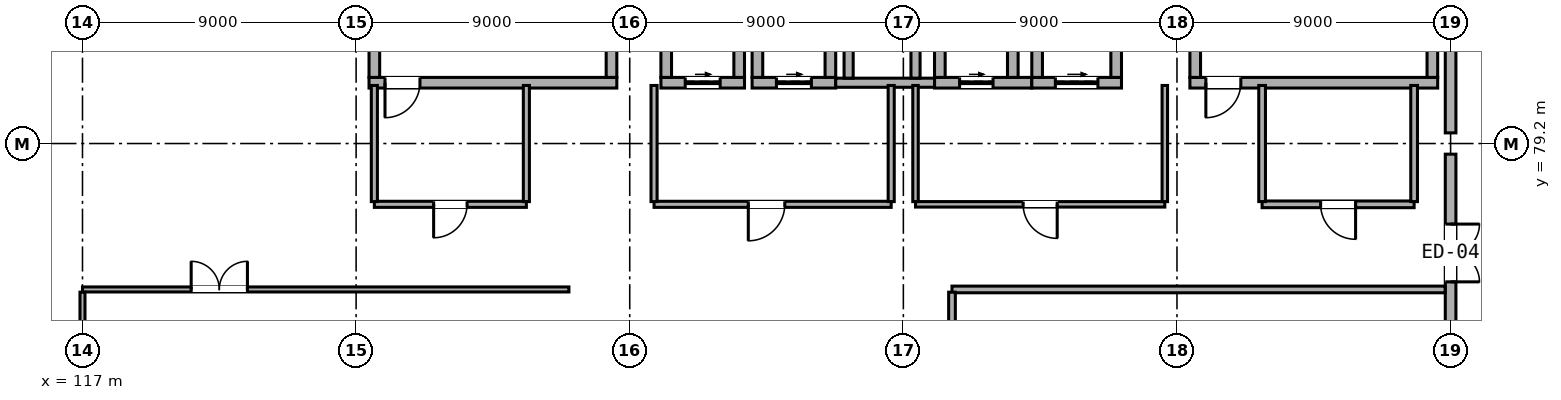
"""IFC4 building model, lengths in metres.
Left out: names, types, materials, properties, quantities, classifications, styles, units other than length and angle.
Written with IfcOpenShell. Run it as: python <this file> out.ifc"""

import sys

from ifc_helpers import new_model, si_unit, direction, frame, frame_2d, origin, origin_2d, place, context, subcontext, project, spatial, rectangle, hollow_rectangle, extrude, element, fill, save


model = new_model("IFC4")
c1 = context("Model", 3, precision=1e-05, world=origin(), true_north=direction((0.0, 1.0)))
c2 = subcontext(c1, "Body", "Model", "MODEL_VIEW")
j1 = project(units=[si_unit("LENGTHUNIT", "METRE"), si_unit("PLANEANGLEUNIT", "RADIAN")], contexts=[c1])
p1 = place(None, origin())
s1 = spatial("IfcSite", under=j1, at=p1, CompositionType="ELEMENT")
p2 = place(p1, origin())
s2 = spatial("IfcBuilding", under=s1, at=p2, CompositionType="ELEMENT")
p3 = place(p2, origin())
s3 = spatial("IfcBuildingStorey", under=s2, at=p3, CompositionType="ELEMENT", Elevation=0.0)
p4 = place(p3, frame((117.0, 79.2, 0.0), z_axis=(0.0, 0.0, 1.0), x_axis=(1.0, 0.0, 0.0)))
e1 = element("IfcColumn", 1, at=p4, inside=s3, PredefinedType="COLUMN", context=c2, shape_type="SweptSolid", body=[
    extrude(hollow_rectangle(XDim=0.7, YDim=0.7, WallThickness=0.028, at=origin_2d()), origin(), (0.0, 0.0, 1.0), 4.8),
])
for number, where, z_axis, x_axis in (
    (2, (126.0, 79.2, 0.0), (0.0, 0.0, 1.0), (1.0, 0.0, 0.0)),
    (3, (135.0, 79.2, 0.0), (0.0, 0.0, 1.0), (1.0, 0.0, 0.0)),
    (4, (144.0, 79.2, 0.0), (0.0, 0.0, 1.0), (1.0, 0.0, 0.0)),
    (5, (153.0, 79.2, 0.0), (0.0, 0.0, 1.0), (1.0, 0.0, 0.0)),
):
    element("IfcColumn", number, at=place(p3, frame(where, z_axis=z_axis, x_axis=x_axis)), inside=s3, PredefinedType="COLUMN", context=c2, shape_type="SweptSolid", body=[
        extrude(hollow_rectangle(XDim=0.75, YDim=0.75, WallThickness=0.032, at=origin_2d()), origin(), (0.0, 0.0, 1.0), 4.8),
    ])
p5 = place(p3, frame((162.0, 79.2, 0.0), z_axis=(0.0, 0.0, 1.0), x_axis=(1.0, 0.0, 0.0)))
e6 = element("IfcColumn", 6, at=p5, inside=s3, PredefinedType="COLUMN", context=c2, shape_type="SweptSolid", body=[
    extrude(hollow_rectangle(XDim=0.7, YDim=0.7, WallThickness=0.028, at=origin_2d()), origin(), (0.0, 0.0, 1.0), 4.8),
])
p6 = place(p3, frame((162.0, 78.85, 0.0), z_axis=(0.0, 0.0, 1.0), x_axis=(0.0, -1.0, 0.0)))
e7 = element("IfcWall", 7, at=p6, inside=s3, PredefinedType="STANDARD", context=c2, shape_type="SweptSolid", body=[
    extrude(rectangle(XDim=6.5, YDim=0.35, at=frame_2d((3.25, 0.0))), origin(), (0.0, 0.0, 1.0), 4.055),
])
p7 = place(p6, frame((2.3, 0.0, 0.0)))
e8 = element("IfcOpeningElement", 8, at=p7, cuts=e7, PredefinedType="OPENING", context=c2, shape_type="SweptSolid", body=[
    extrude(rectangle(XDim=1.9, YDim=2.4, at=frame_2d((0.95, 1.2))), frame((0.0, 0.187, 0.0), z_axis=(0.0, -1.0, 0.0), x_axis=(1.0, 0.0, 0.0)), (0.0, 0.0, 1.0), 0.374),
])
p8 = place(p3, frame((162.0, 86.05, 0.0), z_axis=(0.0, 0.0, 1.0), x_axis=(0.0, -1.0, 0.0)))
e9 = element("IfcWall", 9, at=p8, inside=s3, PredefinedType="STANDARD", context=c2, shape_type="SweptSolid", body=[
    extrude(rectangle(XDim=6.5, YDim=0.35, at=frame_2d((3.25, 0.0))), origin(), (0.0, 0.0, 1.0), 4.055),
])
p9 = place(p3, frame((126.425, 81.2, 0.0), z_axis=(0.0, 0.0, 1.0), x_axis=(1.0, 0.0, 0.0)))
e10 = element("IfcWall", 10, at=p9, inside=s3, PredefinedType="SHEAR", context=c2, shape_type="SweptSolid", body=[
    extrude(rectangle(XDim=8.15, YDim=0.35, at=frame_2d((4.075, 0.0))), origin(), (0.0, 0.0, 1.0), 4.555),
])
p10 = place(p9, frame((0.525, 0.0, 0.0)))
e11 = element("IfcOpeningElement", 11, at=p10, cuts=e10, PredefinedType="OPENING", context=c2, shape_type="SweptSolid", body=[
    extrude(rectangle(XDim=1.15, YDim=2.1, at=frame_2d((0.575, 1.05))), frame((0.0, 0.187, 0.0), z_axis=(0.0, -1.0, 0.0), x_axis=(1.0, 0.0, 0.0)), (0.0, 0.0, 1.0), 0.374),
])
for number, where, z_axis, x_axis in (
    (12, (126.6, 81.375, 0.0), (0.0, 0.0, 1.0), (0.0, 1.0, 0.0)),
    (13, (134.4, 81.375, 0.0), (0.0, 0.0, 1.0), (0.0, 1.0, 0.0)),
):
    element("IfcWall", number, at=place(p3, frame(where, z_axis=z_axis, x_axis=x_axis)), inside=s3, PredefinedType="SHEAR", context=c2, shape_type="SweptSolid", body=[
        extrude(rectangle(XDim=3.55, YDim=0.35, at=frame_2d((1.775, 0.0))), origin(), (0.0, 0.0, 1.0), 4.555),
    ])
p11 = place(p3, frame((153.425, 81.2, 0.0), z_axis=(0.0, 0.0, 1.0), x_axis=(1.0, 0.0, 0.0)))
e14 = element("IfcWall", 14, at=p11, inside=s3, PredefinedType="SHEAR", context=c2, shape_type="SweptSolid", body=[
    extrude(rectangle(XDim=8.15, YDim=0.35, at=frame_2d((4.075, 0.0))), origin(), (0.0, 0.0, 1.0), 4.555),
])
p12 = place(p11, frame((0.525, 0.0, 0.0)))
e15 = element("IfcOpeningElement", 15, at=p12, cuts=e14, PredefinedType="OPENING", context=c2, shape_type="SweptSolid", body=[
    extrude(rectangle(XDim=1.15, YDim=2.1, at=frame_2d((0.575, 1.05))), frame((0.0, 0.187, 0.0), z_axis=(0.0, -1.0, 0.0), x_axis=(1.0, 0.0, 0.0)), (0.0, 0.0, 1.0), 0.374),
])
for number, where, z_axis, x_axis in (
    (16, (153.6, 81.375, 0.0), (0.0, 0.0, 1.0), (0.0, 1.0, 0.0)),
    (17, (161.4, 81.375, 0.0), (0.0, 0.0, 1.0), (0.0, 1.0, 0.0)),
):
    element("IfcWall", number, at=place(p3, frame(where, z_axis=z_axis, x_axis=x_axis)), inside=s3, PredefinedType="SHEAR", context=c2, shape_type="SweptSolid", body=[
        extrude(rectangle(XDim=3.55, YDim=0.35, at=frame_2d((1.775, 0.0))), origin(), (0.0, 0.0, 1.0), 4.555),
    ])
p13 = place(p3, frame((136.025, 81.2, 0.0), z_axis=(0.0, 0.0, 1.0), x_axis=(1.0, 0.0, 0.0)))
e18 = element("IfcWall", 18, at=p13, inside=s3, PredefinedType="SHEAR", context=c2, shape_type="SweptSolid", body=[
    extrude(rectangle(XDim=2.75, YDim=0.35, at=frame_2d((1.375, 0.0))), origin(), (0.0, 0.0, 1.0), 4.555),
])
p14 = place(p13, frame((0.8, 0.0, 0.0)))
e19 = element("IfcOpeningElement", 19, at=p14, cuts=e18, PredefinedType="OPENING", context=c2, shape_type="SweptSolid", body=[
    extrude(rectangle(XDim=1.15, YDim=2.12, at=frame_2d((0.575, 1.06))), frame((0.0, 0.187, 0.0), z_axis=(0.0, -1.0, 0.0), x_axis=(1.0, 0.0, 0.0)), (0.0, 0.0, 1.0), 0.374),
])
for number, where, z_axis, x_axis in (
    (20, (136.2, 81.375, 0.0), (0.0, 0.0, 1.0), (0.0, 1.0, 0.0)),
    (21, (138.6, 81.375, 0.0), (0.0, 0.0, 1.0), (0.0, 1.0, 0.0)),
):
    element("IfcWall", number, at=place(p3, frame(where, z_axis=z_axis, x_axis=x_axis)), inside=s3, PredefinedType="SHEAR", context=c2, shape_type="SweptSolid", body=[
        extrude(rectangle(XDim=2.85, YDim=0.35, at=frame_2d((1.425, 0.0))), origin(), (0.0, 0.0, 1.0), 4.555),
    ])
p15 = place(p3, frame((139.025, 81.2, 0.0), z_axis=(0.0, 0.0, 1.0), x_axis=(1.0, 0.0, 0.0)))
e22 = element("IfcWall", 22, at=p15, inside=s3, PredefinedType="SHEAR", context=c2, shape_type="SweptSolid", body=[
    extrude(rectangle(XDim=2.75, YDim=0.35, at=frame_2d((1.375, 0.0))), origin(), (0.0, 0.0, 1.0), 4.555),
])
p16 = place(p15, frame((0.8, 0.0, 0.0)))
e23 = element("IfcOpeningElement", 23, at=p16, cuts=e22, PredefinedType="OPENING", context=c2, shape_type="SweptSolid", body=[
    extrude(rectangle(XDim=1.15, YDim=2.12, at=frame_2d((0.575, 1.06))), frame((0.0, 0.187, 0.0), z_axis=(0.0, -1.0, 0.0), x_axis=(1.0, 0.0, 0.0)), (0.0, 0.0, 1.0), 0.374),
])
for number, where, z_axis, x_axis in (
    (24, (139.2, 81.375, 0.0), (0.0, 0.0, 1.0), (0.0, 1.0, 0.0)),
    (25, (141.6, 81.375, 0.0), (0.0, 0.0, 1.0), (0.0, 1.0, 0.0)),
):
    element("IfcWall", number, at=place(p3, frame(where, z_axis=z_axis, x_axis=x_axis)), inside=s3, PredefinedType="SHEAR", context=c2, shape_type="SweptSolid", body=[
        extrude(rectangle(XDim=2.85, YDim=0.35, at=frame_2d((1.425, 0.0))), origin(), (0.0, 0.0, 1.0), 4.555),
    ])
p17 = place(p3, frame((145.025, 81.2, 0.0), z_axis=(0.0, 0.0, 1.0), x_axis=(1.0, 0.0, 0.0)))
e26 = element("IfcWall", 26, at=p17, inside=s3, PredefinedType="SHEAR", context=c2, shape_type="SweptSolid", body=[
    extrude(rectangle(XDim=3.2, YDim=0.35, at=frame_2d((1.6, 0.0))), origin(), (0.0, 0.0, 1.0), 4.555),
])
p18 = place(p17, frame((0.825, 0.0, 0.0)))
e27 = element("IfcOpeningElement", 27, at=p18, cuts=e26, PredefinedType="OPENING", context=c2, shape_type="SweptSolid", body=[
    extrude(rectangle(XDim=1.1, YDim=2.1, at=frame_2d((0.55, 1.05))), frame((0.0, 0.187, 0.0), z_axis=(0.0, -1.0, 0.0), x_axis=(1.0, 0.0, 0.0)), (0.0, 0.0, 1.0), 0.374),
])
for number, where, z_axis, x_axis in (
    (28, (145.2, 81.375, 0.0), (0.0, 0.0, 1.0), (0.0, 1.0, 0.0)),
    (29, (147.6, 81.375, 0.0), (0.0, 0.0, 1.0), (0.0, 1.0, 0.0)),
):
    element("IfcWall", number, at=place(p3, frame(where, z_axis=z_axis, x_axis=x_axis)), inside=s3, PredefinedType="SHEAR", context=c2, shape_type="SweptSolid", body=[
        extrude(rectangle(XDim=2.45, YDim=0.35, at=frame_2d((1.225, 0.0))), origin(), (0.0, 0.0, 1.0), 4.555),
    ])
p19 = place(p3, frame((148.225, 81.2, 0.0), z_axis=(0.0, 0.0, 1.0), x_axis=(1.0, 0.0, 0.0)))
e30 = element("IfcWall", 30, at=p19, inside=s3, PredefinedType="SHEAR", context=c2, shape_type="SweptSolid", body=[
    extrude(rectangle(XDim=2.95, YDim=0.35, at=frame_2d((1.475, 0.0))), origin(), (0.0, 0.0, 1.0), 4.555),
])
p20 = place(p19, frame((0.775, 0.0, 0.0)))
e31 = element("IfcOpeningElement", 31, at=p20, cuts=e30, PredefinedType="OPENING", context=c2, shape_type="SweptSolid", body=[
    extrude(rectangle(XDim=1.4, YDim=2.15, at=frame_2d((0.7, 1.075))), frame((0.0, 0.187, 0.0), z_axis=(0.0, -1.0, 0.0), x_axis=(1.0, 0.0, 0.0)), (0.0, 0.0, 1.0), 0.374),
])
for number, where, z_axis, x_axis in (
    (32, (148.4, 81.375, 0.0), (0.0, 0.0, 1.0), (0.0, 1.0, 0.0)),
    (33, (151.0, 81.375, 0.0), (0.0, 0.0, 1.0), (0.0, 1.0, 0.0)),
):
    element("IfcWall", number, at=place(p3, frame(where, z_axis=z_axis, x_axis=x_axis)), inside=s3, PredefinedType="SHEAR", context=c2, shape_type="SweptSolid", body=[
        extrude(rectangle(XDim=3.05, YDim=0.35, at=frame_2d((1.525, 0.0))), origin(), (0.0, 0.0, 1.0), 4.555),
    ])
p21 = place(p3, frame((141.775, 81.2, 0.0), z_axis=(0.0, 0.0, 1.0), x_axis=(1.0, 0.0, 0.0)))
e34 = element("IfcWall", 34, at=p21, inside=s3, PredefinedType="SHEAR", context=c2, shape_type="SweptSolid", body=[
    extrude(rectangle(XDim=3.25, YDim=0.3, at=frame_2d((1.625, 0.0))), origin(), (0.0, 0.0, 1.0), 4.555),
])
for number, where, z_axis, x_axis in (
    (35, (142.2, 81.35, 0.0), (0.0, 0.0, 1.0), (0.0, 1.0, 0.0)),
    (36, (144.4, 81.35, 0.0), (0.0, 0.0, 1.0), (0.0, 1.0, 0.0)),
):
    element("IfcWall", number, at=place(p3, frame(where, z_axis=z_axis, x_axis=x_axis)), inside=s3, PredefinedType="SHEAR", context=c2, shape_type="SweptSolid", body=[
        extrude(rectangle(XDim=2.1, YDim=0.3, at=frame_2d((1.05, 0.0))), origin(), (0.0, 0.0, 1.0), 4.555),
    ])
p22 = place(p3, frame((126.6, 77.2, 0.0), z_axis=(0.0, 0.0, 1.0), x_axis=(1.0, 0.0, 0.0)))
e37 = element("IfcWall", 37, at=p22, inside=s3, PredefinedType="PARTITIONING", context=c2, shape_type="SweptSolid", body=[
    extrude(rectangle(XDim=5.0, YDim=0.2, at=frame_2d((2.5, 0.0))), origin(), (0.0, 0.0, 1.0), 4.555),
])
p23 = place(p22, frame((1.95, 0.0, 0.0)))
e38 = element("IfcOpeningElement", 38, at=p23, cuts=e37, PredefinedType="OPENING", context=c2, shape_type="SweptSolid", body=[
    extrude(rectangle(XDim=1.1, YDim=2.08, at=frame_2d((0.55, 1.04))), frame((0.0, 0.112, 0.0), z_axis=(0.0, -1.0, 0.0), x_axis=(1.0, 0.0, 0.0)), (0.0, 0.0, 1.0), 0.224),
])
for number, where, z_axis, x_axis in (
    (39, (126.6, 77.29, 0.0), (0.0, 0.0, 1.0), (0.0, 1.0, 0.0)),
    (40, (131.6, 77.29, 0.0), (0.0, 0.0, 1.0), (0.0, 1.0, 0.0)),
):
    element("IfcWall", number, at=place(p3, frame(where, z_axis=z_axis, x_axis=x_axis)), inside=s3, PredefinedType="PARTITIONING", context=c2, shape_type="SweptSolid", body=[
        extrude(rectangle(XDim=3.82, YDim=0.2, at=frame_2d((1.91, 0.0))), origin(), (0.0, 0.0, 1.0), 4.555),
    ])
p24 = place(p3, frame((155.8, 77.2, 0.0), z_axis=(0.0, 0.0, 1.0), x_axis=(1.0, 0.0, 0.0)))
e41 = element("IfcWall", 41, at=p24, inside=s3, PredefinedType="PARTITIONING", context=c2, shape_type="SweptSolid", body=[
    extrude(rectangle(XDim=5.0, YDim=0.22, at=frame_2d((2.5, 0.0))), origin(), (0.0, 0.0, 1.0), 4.555),
])
p25 = place(p24, frame((1.925, 0.0, 0.0)))
e42 = element("IfcOpeningElement", 42, at=p25, cuts=e41, PredefinedType="OPENING", context=c2, shape_type="SweptSolid", body=[
    extrude(rectangle(XDim=1.15, YDim=2.1, at=frame_2d((0.575, 1.05))), frame((0.0, 0.122, 0.0), z_axis=(0.0, -1.0, 0.0), x_axis=(1.0, 0.0, 0.0)), (0.0, 0.0, 1.0), 0.244),
])
for number, where, z_axis, x_axis in (
    (43, (155.8, 77.29, 0.0), (0.0, 0.0, 1.0), (0.0, 1.0, 0.0)),
    (44, (160.8, 77.29, 0.0), (0.0, 0.0, 1.0), (0.0, 1.0, 0.0)),
):
    element("IfcWall", number, at=place(p3, frame(where, z_axis=z_axis, x_axis=x_axis)), inside=s3, PredefinedType="PARTITIONING", context=c2, shape_type="SweptSolid", body=[
        extrude(rectangle(XDim=3.82, YDim=0.22, at=frame_2d((1.91, 0.0))), origin(), (0.0, 0.0, 1.0), 4.555),
    ])
p26 = place(p3, frame((135.8, 77.2, 0.0), z_axis=(0.0, 0.0, 1.0), x_axis=(1.0, 0.0, 0.0)))
e45 = element("IfcWall", 45, at=p26, inside=s3, PredefinedType="PARTITIONING", context=c2, shape_type="SweptSolid", body=[
    extrude(rectangle(XDim=7.8, YDim=0.2, at=frame_2d((3.9, 0.0))), origin(), (0.0, 0.0, 1.0), 4.555),
])
p27 = place(p26, frame((3.1, 0.0, 0.0)))
e46 = element("IfcOpeningElement", 46, at=p27, cuts=e45, PredefinedType="OPENING", context=c2, shape_type="SweptSolid", body=[
    extrude(rectangle(XDim=1.2, YDim=2.1, at=frame_2d((0.6, 1.05))), frame((0.0, 0.112, 0.0), z_axis=(0.0, -1.0, 0.0), x_axis=(1.0, 0.0, 0.0)), (0.0, 0.0, 1.0), 0.224),
])
for number, where, z_axis, x_axis in (
    (47, (135.8, 77.29, 0.0), (0.0, 0.0, 1.0), (0.0, 1.0, 0.0)),
    (48, (143.6, 77.29, 0.0), (0.0, 0.0, 1.0), (0.0, 1.0, 0.0)),
):
    element("IfcWall", number, at=place(p3, frame(where, z_axis=z_axis, x_axis=x_axis)), inside=s3, PredefinedType="PARTITIONING", context=c2, shape_type="SweptSolid", body=[
        extrude(rectangle(XDim=3.82, YDim=0.2, at=frame_2d((1.91, 0.0))), origin(), (0.0, 0.0, 1.0), 4.555),
    ])
p28 = place(p3, frame((144.4, 77.2, 0.0), z_axis=(0.0, 0.0, 1.0), x_axis=(1.0, 0.0, 0.0)))
e49 = element("IfcWall", 49, at=p28, inside=s3, PredefinedType="PARTITIONING", context=c2, shape_type="SweptSolid", body=[
    extrude(rectangle(XDim=8.2, YDim=0.18, at=frame_2d((4.1, 0.0))), origin(), (0.0, 0.0, 1.0), 4.555),
])
p29 = place(p28, frame((3.54, 0.0, 0.0)))
e50 = element("IfcOpeningElement", 50, at=p29, cuts=e49, PredefinedType="OPENING", context=c2, shape_type="SweptSolid", body=[
    extrude(rectangle(XDim=1.12, YDim=2.08, at=frame_2d((0.56, 1.04))), frame((0.0, 0.102, 0.0), z_axis=(0.0, -1.0, 0.0), x_axis=(1.0, 0.0, 0.0)), (0.0, 0.0, 1.0), 0.204),
])
for number, where, z_axis, x_axis in (
    (51, (144.4, 77.29, 0.0), (0.0, 0.0, 1.0), (0.0, 1.0, 0.0)),
    (52, (152.6, 77.29, 0.0), (0.0, 0.0, 1.0), (0.0, 1.0, 0.0)),
):
    element("IfcWall", number, at=place(p3, frame(where, z_axis=z_axis, x_axis=x_axis)), inside=s3, PredefinedType="PARTITIONING", context=c2, shape_type="SweptSolid", body=[
        extrude(rectangle(XDim=3.82, YDim=0.18, at=frame_2d((1.91, 0.0))), origin(), (0.0, 0.0, 1.0), 4.555),
    ])
p30 = place(p3, frame((117.0, 74.4, 0.0), z_axis=(0.0, 0.0, 1.0), x_axis=(1.0, 0.0, 0.0)))
e53 = element("IfcWall", 53, at=p30, inside=s3, PredefinedType="PARTITIONING", context=c2, shape_type="SweptSolid", body=[
    extrude(rectangle(XDim=16.0, YDim=0.165, at=frame_2d((8.0, 0.0))), origin(), (0.0, 0.0, 1.0), 4.555),
])
p31 = place(p30, frame((3.575, 0.0, 0.0)))
e54 = element("IfcOpeningElement", 54, at=p31, cuts=e53, PredefinedType="OPENING", context=c2, shape_type="SweptSolid", body=[
    extrude(rectangle(XDim=1.85, YDim=2.12, at=frame_2d((0.925, 1.06))), frame((0.0, 0.094, 0.0), z_axis=(0.0, -1.0, 0.0), x_axis=(1.0, 0.0, 0.0)), (0.0, 0.0, 1.0), 0.189),
])
p32 = place(p3, frame((117.0, 65.49, 0.0), z_axis=(0.0, 0.0, 1.0), x_axis=(0.0, 1.0, 0.0)))
e55 = element("IfcWall", 55, at=p32, inside=s3, PredefinedType="PARTITIONING", context=c2, shape_type="SweptSolid", body=[
    extrude(rectangle(XDim=8.82, YDim=0.165, at=frame_2d((4.41, 0.0))), origin(), (0.0, 0.0, 1.0), 3.835),
])
p33 = place(p3, frame((145.6, 74.4, 0.0), z_axis=(0.0, 0.0, 1.0), x_axis=(1.0, 0.0, 0.0)))
e56 = element("IfcWall", 56, at=p33, inside=s3, PredefinedType="PARTITIONING", context=c2, shape_type="SweptSolid", body=[
    extrude(rectangle(XDim=16.22, YDim=0.22, at=frame_2d((8.11, 0.0))), origin(), (0.0, 0.0, 1.0), 4.555),
])
p34 = place(p3, frame((145.6, 59.49, 0.0), z_axis=(0.0, 0.0, 1.0), x_axis=(0.0, 1.0, 0.0)))
e57 = element("IfcWall", 57, at=p34, inside=s3, PredefinedType="PARTITIONING", context=c2, shape_type="SweptSolid", body=[
    extrude(rectangle(XDim=14.82, YDim=0.22, at=frame_2d((7.41, 0.0))), origin(), (0.0, 0.0, 1.0), 4.555),
])
p35 = place(p34, frame((8.36, 0.0, 0.0)))
e58 = element("IfcOpeningElement", 58, at=p35, cuts=e57, PredefinedType="OPENING", context=c2, shape_type="SweptSolid", body=[
    extrude(rectangle(XDim=1.1, YDim=2.08, at=frame_2d((0.55, 1.04))), frame((0.0, 0.122, 0.0), z_axis=(0.0, -1.0, 0.0), x_axis=(1.0, 0.0, 0.0)), (0.0, 0.0, 1.0), 0.244),
])
p36 = place(p7, origin())
e59 = element("IfcDoor", 59, at=p36, inside=s3, OperationType="DOUBLE_DOOR_SINGLE_SWING", PredefinedType="DOOR", context=c2, shape_type="SweptSolid", body=[
    extrude(rectangle(XDim=1.9, YDim=2.4, at=frame_2d((0.95, 1.2))), frame((0.0, 0.025, 0.0), z_axis=(0.0, -1.0, 0.0), x_axis=(1.0, 0.0, 0.0)), (0.0, 0.0, 1.0), 0.05),
])
fill(e8, e59)
p37 = place(p10, frame((1.15, 0.0, 0.0), z_axis=(0.0, 0.0, 1.0), x_axis=(-1.0, 0.0, 0.0)))
e60 = element("IfcDoor", 60, at=p37, inside=s3, OperationType="SINGLE_SWING_RIGHT", PredefinedType="DOOR", context=c2, shape_type="SweptSolid", body=[
    extrude(rectangle(XDim=1.15, YDim=2.1, at=frame_2d((0.575, 1.05))), frame((0.0, 0.025, 0.0), z_axis=(0.0, -1.0, 0.0), x_axis=(1.0, 0.0, 0.0)), (0.0, 0.0, 1.0), 0.05),
])
fill(e11, e60)
p38 = place(p12, frame((1.15, 0.0, 0.0), z_axis=(0.0, 0.0, 1.0), x_axis=(-1.0, 0.0, 0.0)))
e61 = element("IfcDoor", 61, at=p38, inside=s3, OperationType="SINGLE_SWING_RIGHT", PredefinedType="DOOR", context=c2, shape_type="SweptSolid", body=[
    extrude(rectangle(XDim=1.15, YDim=2.1, at=frame_2d((0.575, 1.05))), frame((0.0, 0.025, 0.0), z_axis=(0.0, -1.0, 0.0), x_axis=(1.0, 0.0, 0.0)), (0.0, 0.0, 1.0), 0.05),
])
fill(e15, e61)
p39 = place(p14, origin())
e62 = element("IfcDoor", 62, at=p39, inside=s3, OperationType="SLIDING_TO_LEFT", PredefinedType="DOOR", context=c2, shape_type="SweptSolid", body=[
    extrude(rectangle(XDim=1.15, YDim=2.12, at=frame_2d((0.575, 1.06))), frame((0.0, 0.025, 0.0), z_axis=(0.0, -1.0, 0.0), x_axis=(1.0, 0.0, 0.0)), (0.0, 0.0, 1.0), 0.05),
])
fill(e19, e62)
p40 = place(p16, origin())
e63 = element("IfcDoor", 63, at=p40, inside=s3, OperationType="SLIDING_TO_LEFT", PredefinedType="DOOR", context=c2, shape_type="SweptSolid", body=[
    extrude(rectangle(XDim=1.15, YDim=2.12, at=frame_2d((0.575, 1.06))), frame((0.0, 0.025, 0.0), z_axis=(0.0, -1.0, 0.0), x_axis=(1.0, 0.0, 0.0)), (0.0, 0.0, 1.0), 0.05),
])
fill(e23, e63)
p41 = place(p18, origin())
e64 = element("IfcDoor", 64, at=p41, inside=s3, OperationType="SLIDING_TO_LEFT", PredefinedType="DOOR", context=c2, shape_type="SweptSolid", body=[
    extrude(rectangle(XDim=1.1, YDim=2.1, at=frame_2d((0.55, 1.05))), frame((0.0, 0.025, 0.0), z_axis=(0.0, -1.0, 0.0), x_axis=(1.0, 0.0, 0.0)), (0.0, 0.0, 1.0), 0.05),
])
fill(e27, e64)
p42 = place(p20, origin())
e65 = element("IfcDoor", 65, at=p42, inside=s3, OperationType="SLIDING_TO_LEFT", PredefinedType="DOOR", context=c2, shape_type="SweptSolid", body=[
    extrude(rectangle(XDim=1.4, YDim=2.15, at=frame_2d((0.7, 1.075))), frame((0.0, 0.025, 0.0), z_axis=(0.0, -1.0, 0.0), x_axis=(1.0, 0.0, 0.0)), (0.0, 0.0, 1.0), 0.05),
])
fill(e31, e65)
p43 = place(p23, frame((1.1, 0.0, 0.0), z_axis=(0.0, 0.0, 1.0), x_axis=(-1.0, 0.0, 0.0)))
e66 = element("IfcDoor", 66, at=p43, inside=s3, OperationType="SINGLE_SWING_RIGHT", PredefinedType="DOOR", context=c2, shape_type="SweptSolid", body=[
    extrude(rectangle(XDim=1.1, YDim=2.08, at=frame_2d((0.55, 1.04))), frame((0.0, 0.025, 0.0), z_axis=(0.0, -1.0, 0.0), x_axis=(1.0, 0.0, 0.0)), (0.0, 0.0, 1.0), 0.05),
])
fill(e38, e66)
p44 = place(p25, frame((1.15, 0.0, 0.0), z_axis=(0.0, 0.0, 1.0), x_axis=(-1.0, 0.0, 0.0)))
e67 = element("IfcDoor", 67, at=p44, inside=s3, OperationType="SINGLE_SWING_LEFT", PredefinedType="DOOR", context=c2, shape_type="SweptSolid", body=[
    extrude(rectangle(XDim=1.15, YDim=2.1, at=frame_2d((0.575, 1.05))), frame((0.0, 0.025, 0.0), z_axis=(0.0, -1.0, 0.0), x_axis=(1.0, 0.0, 0.0)), (0.0, 0.0, 1.0), 0.05),
])
fill(e42, e67)
p45 = place(p27, frame((1.2, 0.0, 0.0), z_axis=(0.0, 0.0, 1.0), x_axis=(-1.0, 0.0, 0.0)))
e68 = element("IfcDoor", 68, at=p45, inside=s3, OperationType="SINGLE_SWING_RIGHT", PredefinedType="DOOR", context=c2, shape_type="SweptSolid", body=[
    extrude(rectangle(XDim=1.2, YDim=2.1, at=frame_2d((0.6, 1.05))), frame((0.0, 0.025, 0.0), z_axis=(0.0, -1.0, 0.0), x_axis=(1.0, 0.0, 0.0)), (0.0, 0.0, 1.0), 0.05),
])
fill(e46, e68)
p46 = place(p29, frame((1.12, 0.0, 0.0), z_axis=(0.0, 0.0, 1.0), x_axis=(-1.0, 0.0, 0.0)))
e69 = element("IfcDoor", 69, at=p46, inside=s3, OperationType="SINGLE_SWING_LEFT", PredefinedType="DOOR", context=c2, shape_type="SweptSolid", body=[
    extrude(rectangle(XDim=1.12, YDim=2.08, at=frame_2d((0.56, 1.04))), frame((0.0, 0.025, 0.0), z_axis=(0.0, -1.0, 0.0), x_axis=(1.0, 0.0, 0.0)), (0.0, 0.0, 1.0), 0.05),
])
fill(e50, e69)
p47 = place(p31, origin())
e70 = element("IfcDoor", 70, at=p47, inside=s3, OperationType="DOUBLE_DOOR_SINGLE_SWING", PredefinedType="DOOR", context=c2, shape_type="SweptSolid", body=[
    extrude(rectangle(XDim=1.85, YDim=2.12, at=frame_2d((0.925, 1.06))), frame((0.0, 0.025, 0.0), z_axis=(0.0, -1.0, 0.0), x_axis=(1.0, 0.0, 0.0)), (0.0, 0.0, 1.0), 0.05),
])
fill(e54, e70)
save(model, sys.argv[1])
